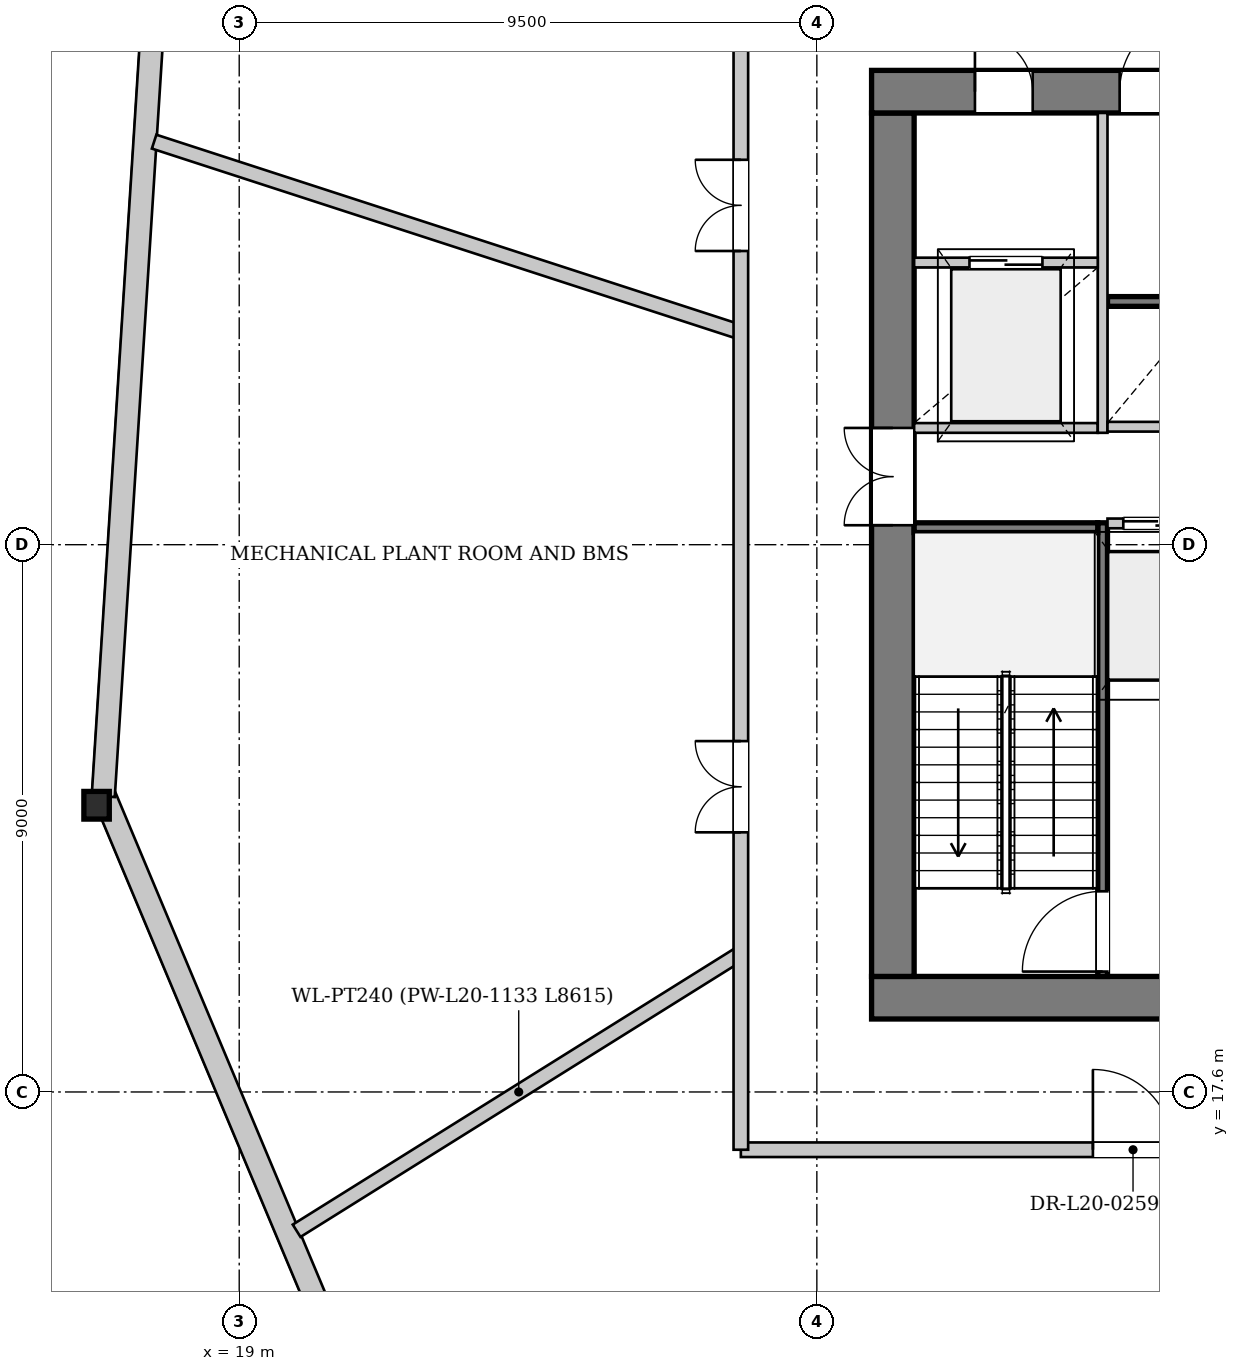
"""IFC4 building model, lengths in metres.
Left out: names, types, materials, properties, quantities, classifications, styles, units other than length and angle.
Written with IfcOpenShell. Run it as: python <this file> out.ifc"""

import sys

from ifc_helpers import new_model, si_unit, direction, frame, frame_2d, origin, origin_2d, place, context, subcontext, project, spatial, rectangle, i_section, extrude, source, transform, mapped, element, fill, save


model = new_model("IFC4")
c1 = context("Model", 3, precision=1e-05, world=origin(), true_north=direction((0.0, 1.0)))
c2 = subcontext(c1, "Body", "Model", "MODEL_VIEW")
j1 = project(units=[si_unit("LENGTHUNIT", "METRE"), si_unit("PLANEANGLEUNIT", "RADIAN")], contexts=[c1])
p1 = place(None, origin())
s1 = spatial("IfcSite", under=j1, at=p1, CompositionType="ELEMENT")
p2 = place(p1, origin())
s2 = spatial("IfcBuilding", under=s1, at=p2, CompositionType="ELEMENT")
p3 = place(p2, frame((0.0, 0.0, 79.9)))
s3 = spatial("IfcBuildingStorey", under=s2, at=p3, CompositionType="ELEMENT", Elevation=79.9)
m1 = source(origin(), c2, "Body", "SweptSolid", [
    extrude(i_section(OverallWidth=0.418, OverallDepth=0.455, WebThickness=0.038, FlangeThickness=0.059, at=origin_2d()), origin(), (0.0, 0.0, 1.0), 4.35),
])
p4 = place(p3, frame((16.574, 22.474, 0.0), z_axis=(0.036763384423, -0.073021623105, 0.996652545336), x_axis=(0.893188004966, 0.449683430632, 0.0)))
e1 = element("IfcColumn", 1, at=p4, inside=s3, PredefinedType="COLUMN", context=c2, shape_type="MappedRepresentation", body=[
    mapped(m1, transform((0.0, 0.0, 0.0), x_axis=(1.0, 0.0, 0.0), y_axis=(0.0, 1.0, 0.0), z_axis=(0.0, 0.0, 1.0), scale=1.0)),
])
p5 = place(p3, frame((23.853, 5.607, 0.0), z_axis=(0.0, 0.0, 1.0), x_axis=(-0.386717925578, 0.922198051417, 0.0)))
e2 = element("IfcWall", 2, at=p5, inside=s3, PredefinedType="SOLIDWALL", context=c2, shape_type="SweptSolid", body=[
    extrude(rectangle(XDim=18.369, YDim=0.38, at=frame_2d((9.185, 0.0))), origin(), (0.0, 0.0, 1.0), 3.642),
])
p6 = place(p3, frame((16.764, 22.462, 0.0), z_axis=(0.0, 0.0, 1.0), x_axis=(0.063622704695, 0.997974023433, 0.0)))
e3 = element("IfcWall", 3, at=p6, inside=s3, PredefinedType="SOLIDWALL", context=c2, shape_type="SweptSolid", body=[
    extrude(rectangle(XDim=18.369, YDim=0.38, at=frame_2d((9.185, 0.0))), origin(), (0.0, 0.0, 1.0), 3.642),
])
p7 = place(p3, frame((46.6, 19.15, 0.0), z_axis=(0.0, 0.0, 1.0), x_axis=(-1.0, 0.0, 0.0)))
e4 = element("IfcWall", 4, at=p7, inside=s3, PredefinedType="SHEAR", context=c2, shape_type="SweptSolid", body=[
    extrude(rectangle(XDim=17.2, YDim=0.7, at=frame_2d((8.6, 0.0))), origin(), (0.0, 0.0, 1.0), 4.25),
])
p8 = place(p7, frame((4.8, 0.0, 0.0)))
e5 = element("IfcOpeningElement", 5, at=p8, cuts=e4, PredefinedType="OPENING", context=c2, shape_type="SweptSolid", body=[
    extrude(rectangle(XDim=1.12, YDim=2.25, at=frame_2d((0.56, 1.125))), frame((0.0, 0.36, 0.0), z_axis=(0.0, -1.0, 0.0), x_axis=(1.0, 0.0, 0.0)), (0.0, 0.0, 1.0), 0.72),
])
p9 = place(p7, frame((11.3, 0.0, 0.0)))
e6 = element("IfcOpeningElement", 6, at=p9, cuts=e4, PredefinedType="OPENING", context=c2, shape_type="SweptSolid", body=[
    extrude(rectangle(XDim=1.12, YDim=2.25, at=frame_2d((0.56, 1.125))), frame((0.0, 0.36, 0.0), z_axis=(0.0, -1.0, 0.0), x_axis=(1.0, 0.0, 0.0)), (0.0, 0.0, 1.0), 0.72),
])
p10 = place(p3, frame((29.75, 19.5, 0.0), z_axis=(0.0, 0.0, 1.0), x_axis=(0.0, 1.0, 0.0)))
e7 = element("IfcWall", 7, at=p10, inside=s3, PredefinedType="SHEAR", context=c2, shape_type="SweptSolid", body=[
    extrude(rectangle(XDim=14.2, YDim=0.7, at=frame_2d((7.1, 0.0))), origin(), (0.0, 0.0, 1.0), 4.25),
])
p11 = place(p10, frame((7.42, 0.0, 0.0)))
e8 = element("IfcOpeningElement", 8, at=p11, cuts=e7, PredefinedType="OPENING", context=c2, shape_type="SweptSolid", body=[
    extrude(rectangle(XDim=1.6, YDim=2.2, at=frame_2d((0.8, 1.1))), frame((0.0, 0.36, 0.0), z_axis=(0.0, -1.0, 0.0), x_axis=(1.0, 0.0, 0.0)), (0.0, 0.0, 1.0), 0.72),
])
p12 = place(p3, frame((29.4, 34.05, 0.0), z_axis=(0.0, 0.0, 1.0), x_axis=(1.0, 0.0, 0.0)))
e9 = element("IfcWall", 9, at=p12, inside=s3, PredefinedType="SHEAR", context=c2, shape_type="SweptSolid", body=[
    extrude(rectangle(XDim=17.2, YDim=0.7, at=frame_2d((8.6, 0.0))), origin(), (0.0, 0.0, 1.0), 4.25),
])
p13 = place(p12, frame((1.7, 0.0, 0.0)))
e10 = element("IfcOpeningElement", 10, at=p13, cuts=e9, PredefinedType="OPENING", context=c2, shape_type="SweptSolid", body=[
    extrude(rectangle(XDim=0.95, YDim=2.1, at=frame_2d((0.475, 1.05))), frame((0.0, 0.36, 0.0), z_axis=(0.0, -1.0, 0.0), x_axis=(1.0, 0.0, 0.0)), (0.0, 0.0, 1.0), 0.72),
])
p14 = place(p12, frame((4.08, 0.0, 0.0)))
e11 = element("IfcOpeningElement", 11, at=p14, cuts=e9, PredefinedType="OPENING", context=c2, shape_type="SweptSolid", body=[
    extrude(rectangle(XDim=1.32, YDim=2.2, at=frame_2d((0.66, 1.1))), frame((0.0, 0.36, 0.0), z_axis=(0.0, -1.0, 0.0), x_axis=(1.0, 0.0, 0.0)), (0.0, 0.0, 1.0), 0.72),
])
p15 = place(p12, frame((15.15, 0.0, 0.0)))
e12 = element("IfcOpeningElement", 12, at=p15, cuts=e9, PredefinedType="OPENING", context=c2, shape_type="SweptSolid", body=[
    extrude(rectangle(XDim=0.95, YDim=2.1, at=frame_2d((0.475, 1.05))), frame((0.0, 0.36, 0.0), z_axis=(0.0, -1.0, 0.0), x_axis=(1.0, 0.0, 0.0)), (0.0, 0.0, 1.0), 0.72),
])
p16 = place(p3, frame((33.2, 19.5, 0.0), z_axis=(0.0, 0.0, 1.0), x_axis=(0.0, 1.0, 0.0)))
e13 = element("IfcWall", 13, at=p16, inside=s3, PredefinedType="PARTITIONING", context=c2, shape_type="SweptSolid", body=[
    extrude(rectangle(XDim=7.46, YDim=0.16, at=frame_2d((3.73, 0.0))), origin(), (0.0, 0.0, 1.0), 4.25),
])
p17 = place(p16, frame((0.08, 0.0, 0.0)))
e14 = element("IfcOpeningElement", 14, at=p17, cuts=e13, PredefinedType="OPENING", context=c2, shape_type="SweptSolid", body=[
    extrude(rectangle(XDim=1.32, YDim=2.2, at=frame_2d((0.66, 1.1))), frame((0.0, 0.09, 0.0), z_axis=(0.0, -1.0, 0.0), x_axis=(1.0, 0.0, 0.0)), (0.0, 0.0, 1.0), 0.18),
])
p18 = place(p3, frame((30.1, 26.88, 0.0), z_axis=(0.0, 0.0, 1.0), x_axis=(1.0, 0.0, 0.0)))
e15 = element("IfcWall", 15, at=p18, inside=s3, PredefinedType="PARTITIONING", context=c2, shape_type="SweptSolid", body=[
    extrude(rectangle(XDim=3.02, YDim=0.16, at=frame_2d((1.51, 0.0))), origin(), (0.0, 0.0, 1.0), 4.25),
])
p19 = place(p3, frame((33.28, 30.6, 0.0), z_axis=(0.0, 0.0, 1.0), x_axis=(1.0, 0.0, 0.0)))
e16 = element("IfcWall", 16, at=p19, inside=s3, PredefinedType="PARTITIONING", context=c2, shape_type="SweptSolid", body=[
    extrude(rectangle(XDim=7.3, YDim=0.16, at=frame_2d((3.65, 0.0))), origin(), (0.0, 0.0, 1.0), 4.25),
])
p20 = place(p3, frame((33.28, 24.49, 0.0), z_axis=(0.0, 0.0, 1.0), x_axis=(1.0, 0.0, 0.0)))
e17 = element("IfcWall", 17, at=p20, inside=s3, PredefinedType="PARTITIONING", context=c2, shape_type="SweptSolid", body=[
    extrude(rectangle(XDim=9.44, YDim=0.16, at=frame_2d((4.72, 0.0))), origin(), (0.0, 0.0, 1.0), 4.25),
])
p21 = place(p3, frame((30.1, 28.52, 0.0), z_axis=(0.0, 0.0, 1.0), x_axis=(1.0, 0.0, 0.0)))
e18 = element("IfcWall", 18, at=p21, inside=s3, PredefinedType="PARTITIONING", context=c2, shape_type="SweptSolid", body=[
    extrude(rectangle(XDim=3.02, YDim=0.16, at=frame_2d((1.51, 0.0))), origin(), (0.0, 0.0, 1.0), 4.25),
])
p22 = place(p3, frame((33.2, 28.44, 0.0), z_axis=(0.0, 0.0, 1.0), x_axis=(0.0, 1.0, 0.0)))
e19 = element("IfcWall", 19, at=p22, inside=s3, PredefinedType="PARTITIONING", context=c2, shape_type="SweptSolid", body=[
    extrude(rectangle(XDim=5.26, YDim=0.16, at=frame_2d((2.63, 0.0))), origin(), (0.0, 0.0, 1.0), 4.25),
])
p23 = place(p3, frame((30.1, 31.24, 0.0), z_axis=(0.0, 0.0, 1.0), x_axis=(1.0, 0.0, 0.0)))
e20 = element("IfcWall", 20, at=p23, inside=s3, PredefinedType="PARTITIONING", context=c2, shape_type="SweptSolid", body=[
    extrude(rectangle(XDim=3.02, YDim=0.16, at=frame_2d((1.51, 0.0))), origin(), (0.0, 0.0, 1.0), 4.25),
])
p24 = place(p23, frame((0.91, 0.0, 0.0)))
e21 = element("IfcOpeningElement", 21, at=p24, cuts=e20, PredefinedType="OPENING", context=c2, shape_type="SweptSolid", body=[
    extrude(rectangle(XDim=1.2, YDim=2.2, at=frame_2d((0.6, 1.1))), frame((0.0, 0.09, 0.0), z_axis=(0.0, -1.0, 0.0), x_axis=(1.0, 0.0, 0.0)), (0.0, 0.0, 1.0), 0.18),
])
p25 = place(p3, frame((33.28, 26.95, 0.0), z_axis=(0.0, 0.0, 1.0), x_axis=(1.0, 0.0, 0.0)))
e22 = element("IfcWall", 22, at=p25, inside=s3, PredefinedType="PARTITIONING", context=c2, shape_type="SweptSolid", body=[
    extrude(rectangle(XDim=9.44, YDim=0.16, at=frame_2d((4.72, 0.0))), origin(), (0.0, 0.0, 1.0), 4.25),
])
p26 = place(p25, frame((0.26, 0.0, 0.0)))
e23 = element("IfcOpeningElement", 23, at=p26, cuts=e22, PredefinedType="OPENING", context=c2, shape_type="SweptSolid", body=[
    extrude(rectangle(XDim=1.1, YDim=2.2, at=frame_2d((0.55, 1.1))), frame((0.0, 0.09, 0.0), z_axis=(0.0, -1.0, 0.0), x_axis=(1.0, 0.0, 0.0)), (0.0, 0.0, 1.0), 0.18),
])
p27 = place(p25, frame((2.01, 0.0, 0.0)))
e24 = element("IfcOpeningElement", 24, at=p27, cuts=e22, PredefinedType="OPENING", context=c2, shape_type="SweptSolid", body=[
    extrude(rectangle(XDim=1.1, YDim=2.2, at=frame_2d((0.55, 1.1))), frame((0.0, 0.09, 0.0), z_axis=(0.0, -1.0, 0.0), x_axis=(1.0, 0.0, 0.0)), (0.0, 0.0, 1.0), 0.18),
])
p28 = place(p25, frame((3.76, 0.0, 0.0)))
e25 = element("IfcOpeningElement", 25, at=p28, cuts=e22, PredefinedType="OPENING", context=c2, shape_type="SweptSolid", body=[
    extrude(rectangle(XDim=1.1, YDim=2.2, at=frame_2d((0.55, 1.1))), frame((0.0, 0.09, 0.0), z_axis=(0.0, -1.0, 0.0), x_axis=(1.0, 0.0, 0.0)), (0.0, 0.0, 1.0), 0.18),
])
p29 = place(p25, frame((5.51, 0.0, 0.0)))
e26 = element("IfcOpeningElement", 26, at=p29, cuts=e22, PredefinedType="OPENING", context=c2, shape_type="SweptSolid", body=[
    extrude(rectangle(XDim=1.1, YDim=2.2, at=frame_2d((0.55, 1.1))), frame((0.0, 0.09, 0.0), z_axis=(0.0, -1.0, 0.0), x_axis=(1.0, 0.0, 0.0)), (0.0, 0.0, 1.0), 0.18),
])
p30 = place(p3, frame((33.28, 28.54, 0.0), z_axis=(0.0, 0.0, 1.0), x_axis=(1.0, 0.0, 0.0)))
e27 = element("IfcWall", 27, at=p30, inside=s3, PredefinedType="PARTITIONING", context=c2, shape_type="SweptSolid", body=[
    extrude(rectangle(XDim=12.62, YDim=0.16, at=frame_2d((6.31, 0.0))), origin(), (0.0, 0.0, 1.0), 4.25),
])
p31 = place(p3, frame((27.25, 19.883, 0.0), z_axis=(0.0, 0.0, 1.0), x_axis=(-0.848038103276, -0.529935255849, 0.0)))
e28 = element("IfcWall", 28, at=p31, inside=s3, PredefinedType="PARTITIONING", context=c2, shape_type="SweptSolid", body=[
    extrude(rectangle(XDim=8.615, YDim=0.24, at=frame_2d((4.308, 0.0))), origin(), (0.0, 0.0, 1.0), 4.25),
])
p32 = place(p3, frame((27.25, 30.093, 0.0), z_axis=(0.0, 0.0, 1.0), x_axis=(-0.95105740787, 0.309014250376, 0.0)))
e29 = element("IfcWall", 29, at=p32, inside=s3, PredefinedType="PARTITIONING", context=c2, shape_type="SweptSolid", body=[
    extrude(rectangle(XDim=10.146, YDim=0.24, at=frame_2d((5.073, 0.0))), origin(), (0.0, 0.0, 1.0), 4.25),
])
p33 = place(p3, frame((27.25, 16.65, 0.0), z_axis=(0.0, 0.0, 1.0), x_axis=(1.0, 0.0, 0.0)))
e30 = element("IfcWall", 30, at=p33, inside=s3, PredefinedType="PARTITIONING", context=c2, shape_type="SweptSolid", body=[
    extrude(rectangle(XDim=21.5, YDim=0.24, at=frame_2d((10.75, 0.0))), origin(), (0.0, 0.0, 1.0), 4.25),
])
p34 = place(p33, frame((5.79, 0.0, 0.0)))
e31 = element("IfcOpeningElement", 31, at=p34, cuts=e30, PredefinedType="OPENING", context=c2, shape_type="SweptSolid", body=[
    extrude(rectangle(XDim=1.32, YDim=2.2, at=frame_2d((0.66, 1.1))), frame((0.0, 0.13, 0.0), z_axis=(0.0, -1.0, 0.0), x_axis=(1.0, 0.0, 0.0)), (0.0, 0.0, 1.0), 0.26),
])
p35 = place(p33, frame((14.39, 0.0, 0.0)))
e32 = element("IfcOpeningElement", 32, at=p35, cuts=e30, PredefinedType="OPENING", context=c2, shape_type="SweptSolid", body=[
    extrude(rectangle(XDim=1.5, YDim=2.25, at=frame_2d((0.75, 1.125))), frame((0.0, 0.13, 0.0), z_axis=(0.0, -1.0, 0.0), x_axis=(1.0, 0.0, 0.0)), (0.0, 0.0, 1.0), 0.26),
])
p36 = place(p3, frame((27.25, 16.65, 0.0), z_axis=(0.0, 0.0, 1.0), x_axis=(0.0, 1.0, 0.0)))
e33 = element("IfcWall", 33, at=p36, inside=s3, PredefinedType="PARTITIONING", context=c2, shape_type="SweptSolid", body=[
    extrude(rectangle(XDim=19.9, YDim=0.24, at=frame_2d((9.95, 0.0))), origin(), (0.0, 0.0, 1.0), 4.25),
])
p37 = place(p36, frame((5.22, 0.0, 0.0)))
e34 = element("IfcOpeningElement", 34, at=p37, cuts=e33, PredefinedType="OPENING", context=c2, shape_type="SweptSolid", body=[
    extrude(rectangle(XDim=1.5, YDim=2.25, at=frame_2d((0.75, 1.125))), frame((0.0, 0.13, 0.0), z_axis=(0.0, -1.0, 0.0), x_axis=(1.0, 0.0, 0.0)), (0.0, 0.0, 1.0), 0.26),
])
p38 = place(p36, frame((14.78, 0.0, 0.0)))
e35 = element("IfcOpeningElement", 35, at=p38, cuts=e33, PredefinedType="OPENING", context=c2, shape_type="SweptSolid", body=[
    extrude(rectangle(XDim=1.5, YDim=2.25, at=frame_2d((0.75, 1.125))), frame((0.0, 0.13, 0.0), z_axis=(0.0, -1.0, 0.0), x_axis=(1.0, 0.0, 0.0)), (0.0, 0.0, 1.0), 0.26),
])
m2 = source(origin(), c2, "Body", "SweptSolid", [
    extrude(rectangle(XDim=1.6, YDim=2.2, at=frame_2d((0.8, 1.1))), frame((0.0, 0.025, 0.0), z_axis=(0.0, -1.0, 0.0), x_axis=(1.0, 0.0, 0.0)), (0.0, 0.0, 1.0), 0.05),
])
p39 = place(p11, origin())
e36 = element("IfcDoor", 36, at=p39, inside=s3, OperationType="DOUBLE_DOOR_SINGLE_SWING", PredefinedType="DOOR", context=c2, shape_type="MappedRepresentation", body=[
    mapped(m2, transform((0.0, 0.0, 0.0), x_axis=(1.0, 0.0, 0.0), y_axis=(0.0, 1.0, 0.0), z_axis=(0.0, 0.0, 1.0), scale=1.0)),
])
fill(e8, e36)
m3 = source(origin(), c2, "Body", "SweptSolid", [
    extrude(rectangle(XDim=0.95, YDim=2.1, at=frame_2d((0.475, 1.05))), frame((0.0, 0.025, 0.0), z_axis=(0.0, -1.0, 0.0), x_axis=(1.0, 0.0, 0.0)), (0.0, 0.0, 1.0), 0.05),
])
p40 = place(p13, origin())
e37 = element("IfcDoor", 37, at=p40, inside=s3, OperationType="SINGLE_SWING_LEFT", PredefinedType="DOOR", context=c2, shape_type="MappedRepresentation", body=[
    mapped(m3, transform((0.0, 0.0, 0.0), x_axis=(1.0, 0.0, 0.0), y_axis=(0.0, 1.0, 0.0), z_axis=(0.0, 0.0, 1.0), scale=1.0)),
])
fill(e10, e37)
m4 = source(origin(), c2, "Body", "SweptSolid", [
    extrude(rectangle(XDim=1.32, YDim=2.2, at=frame_2d((0.66, 1.1))), frame((0.0, 0.025, 0.0), z_axis=(0.0, -1.0, 0.0), x_axis=(1.0, 0.0, 0.0)), (0.0, 0.0, 1.0), 0.05),
])
p41 = place(p14, origin())
e38 = element("IfcDoor", 38, at=p41, inside=s3, OperationType="SINGLE_SWING_RIGHT", PredefinedType="DOOR", context=c2, shape_type="MappedRepresentation", body=[
    mapped(m4, transform((0.0, 0.0, 0.0), x_axis=(1.0, 0.0, 0.0), y_axis=(0.0, 1.0, 0.0), z_axis=(0.0, 0.0, 1.0), scale=1.0)),
])
fill(e11, e38)
p42 = place(p17, origin())
e39 = element("IfcDoor", 39, at=p42, inside=s3, OperationType="SINGLE_SWING_LEFT", PredefinedType="DOOR", context=c2, shape_type="MappedRepresentation", body=[
    mapped(m4, transform((0.0, 0.0, 0.0), x_axis=(1.0, 0.0, 0.0), y_axis=(0.0, 1.0, 0.0), z_axis=(0.0, 0.0, 1.0), scale=1.0)),
])
fill(e14, e39)
m5 = source(origin(), c2, "Body", "SweptSolid", [
    extrude(rectangle(XDim=1.2, YDim=2.2, at=frame_2d((0.6, 1.1))), frame((0.0, 0.025, 0.0), z_axis=(0.0, -1.0, 0.0), x_axis=(1.0, 0.0, 0.0)), (0.0, 0.0, 1.0), 0.05),
])
p43 = place(p24, origin())
e40 = element("IfcDoor", 40, at=p43, inside=s3, OperationType="DOUBLE_DOOR_SLIDING", PredefinedType="DOOR", context=c2, shape_type="MappedRepresentation", body=[
    mapped(m5, transform((0.0, 0.0, 0.0), x_axis=(1.0, 0.0, 0.0), y_axis=(0.0, 1.0, 0.0), z_axis=(0.0, 0.0, 1.0), scale=1.0)),
])
fill(e21, e40)
m6 = source(origin(), c2, "Body", "SweptSolid", [
    extrude(rectangle(XDim=1.1, YDim=2.2, at=frame_2d((0.55, 1.1))), frame((0.0, 0.025, 0.0), z_axis=(0.0, -1.0, 0.0), x_axis=(1.0, 0.0, 0.0)), (0.0, 0.0, 1.0), 0.05),
])
p44 = place(p26, origin())
e41 = element("IfcDoor", 41, at=p44, inside=s3, OperationType="DOUBLE_DOOR_SLIDING", PredefinedType="DOOR", context=c2, shape_type="MappedRepresentation", body=[
    mapped(m6, transform((0.0, 0.0, 0.0), x_axis=(1.0, 0.0, 0.0), y_axis=(0.0, 1.0, 0.0), z_axis=(0.0, 0.0, 1.0), scale=1.0)),
])
fill(e23, e41)
p45 = place(p34, origin())
e42 = element("IfcDoor", 42, at=p45, inside=s3, OperationType="SINGLE_SWING_LEFT", PredefinedType="DOOR", context=c2, shape_type="MappedRepresentation", body=[
    mapped(m4, transform((0.0, 0.0, 0.0), x_axis=(1.0, 0.0, 0.0), y_axis=(0.0, 1.0, 0.0), z_axis=(0.0, 0.0, 1.0), scale=1.0)),
])
fill(e31, e42)
m7 = source(origin(), c2, "Body", "SweptSolid", [
    extrude(rectangle(XDim=1.5, YDim=2.25, at=frame_2d((0.75, 1.125))), frame((0.0, 0.025, 0.0), z_axis=(0.0, -1.0, 0.0), x_axis=(1.0, 0.0, 0.0)), (0.0, 0.0, 1.0), 0.05),
])
p46 = place(p37, origin())
e43 = element("IfcDoor", 43, at=p46, inside=s3, OperationType="DOUBLE_DOOR_SINGLE_SWING", PredefinedType="DOOR", context=c2, shape_type="MappedRepresentation", body=[
    mapped(m7, transform((0.0, 0.0, 0.0), x_axis=(1.0, 0.0, 0.0), y_axis=(0.0, 1.0, 0.0), z_axis=(0.0, 0.0, 1.0), scale=1.0)),
])
fill(e34, e43)
p47 = place(p38, origin())
e44 = element("IfcDoor", 44, at=p47, inside=s3, OperationType="DOUBLE_DOOR_SINGLE_SWING", PredefinedType="DOOR", context=c2, shape_type="MappedRepresentation", body=[
    mapped(m7, transform((0.0, 0.0, 0.0), x_axis=(1.0, 0.0, 0.0), y_axis=(0.0, 1.0, 0.0), z_axis=(0.0, 0.0, 1.0), scale=1.0)),
])
fill(e35, e44)
save(model, sys.argv[1])
